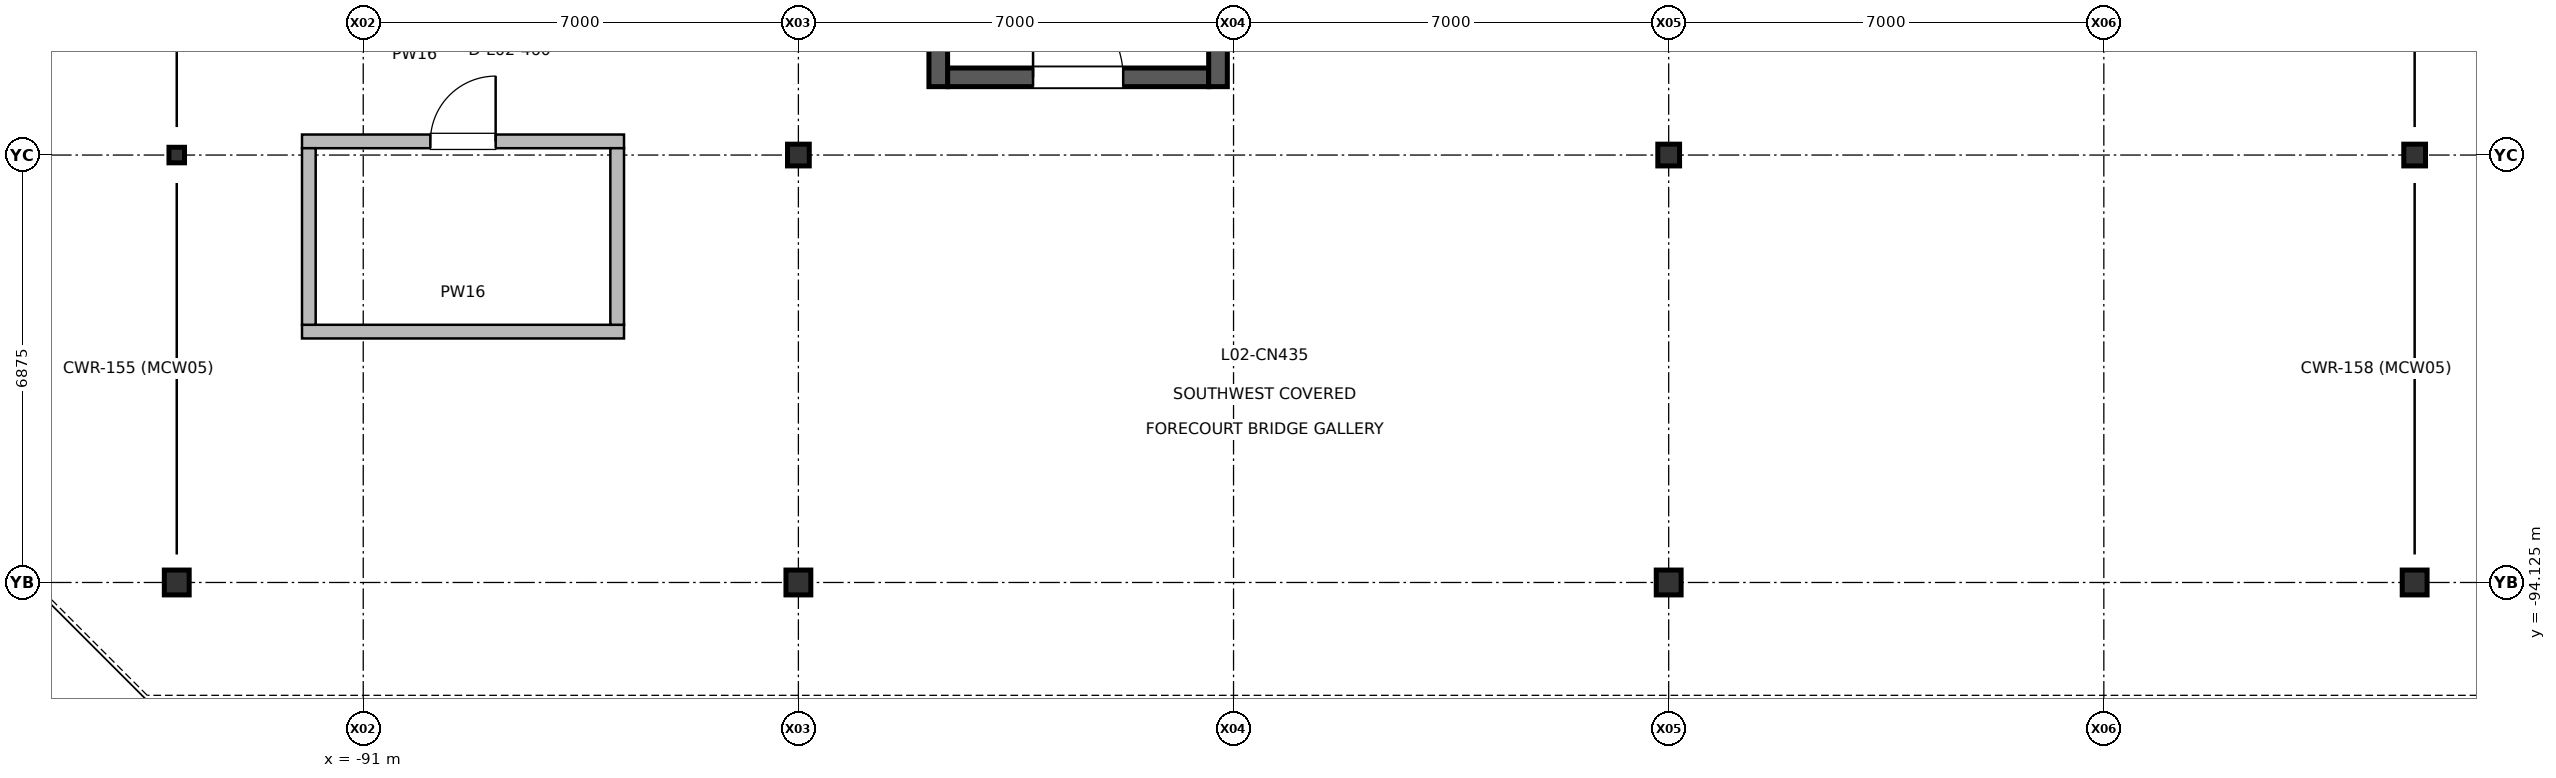
"""IFC4 building model, lengths in metres.
Left out: names, types, materials, properties, quantities, classifications, styles, units other than length and angle.
Written with IfcOpenShell. Run it as: python <this file> out.ifc"""

import sys

from ifc_helpers import new_model, si_unit, direction, frame, frame_2d, origin, origin_2d, place, context, subcontext, project, spatial, rectangle, i_section, extrude, element, fill, save


model = new_model("IFC4")
c1 = context("Model", 3, precision=1e-05, world=origin(), true_north=direction((0.0, 1.0)))
c2 = subcontext(c1, "Body", "Model", "MODEL_VIEW")
j1 = project(units=[si_unit("LENGTHUNIT", "METRE"), si_unit("PLANEANGLEUNIT", "RADIAN")], contexts=[c1])
p1 = place(None, origin())
s1 = spatial("IfcSite", under=j1, at=p1, CompositionType="ELEMENT")
p2 = place(p1, origin())
s2 = spatial("IfcBuilding", under=s1, at=p2, CompositionType="ELEMENT")
p3 = place(p2, frame((0.0, 0.0, 6.0)))
s3 = spatial("IfcBuildingStorey", under=s2, at=p3, CompositionType="ELEMENT", Elevation=6.0)
p4 = place(p3, frame((-94.0, -94.125, 0.0), z_axis=(0.0, 0.0, 1.0), x_axis=(1.0, 0.0, 0.0)))
e1 = element("IfcColumn", 1, at=p4, inside=s3, PredefinedType="COLUMN", context=c2, shape_type="SweptSolid", body=[
    extrude(i_section(OverallWidth=0.4, OverallDepth=0.4, WebThickness=0.013, FlangeThickness=0.021, at=origin_2d()), origin(), (0.0, 0.0, 1.0), 5.4),
])
p5 = place(p3, frame((-94.0, -87.25, 0.0), z_axis=(0.0, 0.0, 1.0), x_axis=(1.0, 0.0, 0.0)))
e2 = element("IfcColumn", 2, at=p5, inside=s3, PredefinedType="COLUMN", context=c2, shape_type="SweptSolid", body=[
    extrude(i_section(OverallWidth=0.25, OverallDepth=0.25, WebThickness=0.009, FlangeThickness=0.014, at=origin_2d()), origin(), (0.0, 0.0, 1.0), 5.4),
])
p6 = place(p3, frame((-84.0, -94.125, 0.0), z_axis=(0.0, 0.0, 1.0), x_axis=(1.0, 0.0, 0.0)))
e3 = element("IfcColumn", 3, at=p6, inside=s3, PredefinedType="COLUMN", context=c2, shape_type="SweptSolid", body=[
    extrude(i_section(OverallWidth=0.4, OverallDepth=0.4, WebThickness=0.013, FlangeThickness=0.021, at=origin_2d()), origin(), (0.0, 0.0, 1.0), 5.4),
])
p7 = place(p3, frame((-84.0, -87.25, 0.0), z_axis=(0.0, 0.0, 1.0), x_axis=(1.0, 0.0, 0.0)))
e4 = element("IfcColumn", 4, at=p7, inside=s3, PredefinedType="COLUMN", context=c2, shape_type="SweptSolid", body=[
    extrude(i_section(OverallWidth=0.35, OverallDepth=0.35, WebThickness=0.012, FlangeThickness=0.019, at=origin_2d()), origin(), (0.0, 0.0, 1.0), 5.4),
])
p8 = place(p3, frame((-70.0, -94.125, 0.0), z_axis=(0.0, 0.0, 1.0), x_axis=(1.0, 0.0, 0.0)))
e5 = element("IfcColumn", 5, at=p8, inside=s3, PredefinedType="COLUMN", context=c2, shape_type="SweptSolid", body=[
    extrude(i_section(OverallWidth=0.4, OverallDepth=0.4, WebThickness=0.013, FlangeThickness=0.021, at=origin_2d()), origin(), (0.0, 0.0, 1.0), 5.4),
])
p9 = place(p3, frame((-70.0, -87.25, 0.0), z_axis=(0.0, 0.0, 1.0), x_axis=(1.0, 0.0, 0.0)))
e6 = element("IfcColumn", 6, at=p9, inside=s3, PredefinedType="COLUMN", context=c2, shape_type="SweptSolid", body=[
    extrude(i_section(OverallWidth=0.35, OverallDepth=0.35, WebThickness=0.012, FlangeThickness=0.019, at=origin_2d()), origin(), (0.0, 0.0, 1.0), 5.4),
])
p10 = place(p3, frame((-58.0, -94.125, 0.0), z_axis=(0.0, 0.0, 1.0), x_axis=(1.0, 0.0, 0.0)))
e7 = element("IfcColumn", 7, at=p10, inside=s3, PredefinedType="COLUMN", context=c2, shape_type="SweptSolid", body=[
    extrude(i_section(OverallWidth=0.4, OverallDepth=0.4, WebThickness=0.013, FlangeThickness=0.021, at=origin_2d()), origin(), (0.0, 0.0, 1.0), 5.4),
])
p11 = place(p3, frame((-58.0, -87.25, 0.0), z_axis=(0.0, 0.0, 1.0), x_axis=(1.0, 0.0, 0.0)))
e8 = element("IfcColumn", 8, at=p11, inside=s3, PredefinedType="COLUMN", context=c2, shape_type="SweptSolid", body=[
    extrude(i_section(OverallWidth=0.35, OverallDepth=0.35, WebThickness=0.012, FlangeThickness=0.019, at=origin_2d()), origin(), (0.0, 0.0, 1.0), 5.4),
])
p12 = place(p3, frame((-91.985, -87.03, 0.0), z_axis=(0.0, 0.0, 1.0), x_axis=(1.0, 0.0, 0.0)))
e9 = element("IfcWall", 9, at=p12, inside=s3, PredefinedType="PARTITIONING", context=c2, shape_type="SweptSolid", body=[
    extrude(rectangle(XDim=5.18, YDim=0.22, at=frame_2d((2.59, 0.0))), origin(), (0.0, 0.0, 1.0), 4.42),
])
p13 = place(p12, frame((2.065, 0.0, 0.0)))
e10 = element("IfcOpeningElement", 10, at=p13, cuts=e9, PredefinedType="OPENING", context=c2, shape_type="SweptSolid", body=[
    extrude(rectangle(XDim=1.05, YDim=2.25, at=frame_2d((0.525, 1.125))), frame((0.0, 0.12, 0.0), z_axis=(0.0, -1.0, 0.0), x_axis=(1.0, 0.0, 0.0)), (0.0, 0.0, 1.0), 0.24),
])
p14 = place(p3, frame((-91.985, -90.09, 0.0), z_axis=(0.0, 0.0, 1.0), x_axis=(1.0, 0.0, 0.0)))
e11 = element("IfcWall", 11, at=p14, inside=s3, PredefinedType="PARTITIONING", context=c2, shape_type="SweptSolid", body=[
    extrude(rectangle(XDim=5.18, YDim=0.22, at=frame_2d((2.59, 0.0))), origin(), (0.0, 0.0, 1.0), 4.42),
])
for number, where, z_axis, x_axis in (
    (12, (-91.875, -89.98, 0.0), (0.0, 0.0, 1.0), (0.0, 1.0, 0.0)),
    (13, (-86.915, -89.98, 0.0), (0.0, 0.0, 1.0), (0.0, 1.0, 0.0)),
):
    element("IfcWall", number, at=place(p3, frame(where, z_axis=z_axis, x_axis=x_axis)), inside=s3, PredefinedType="PARTITIONING", context=c2, shape_type="SweptSolid", body=[
        extrude(rectangle(XDim=2.84, YDim=0.22, at=frame_2d((1.42, 0.0))), origin(), (0.0, 0.0, 1.0), 4.42),
    ])
p15 = place(p3, frame((-81.6, -86.0, 0.0), z_axis=(0.0, 0.0, 1.0), x_axis=(1.0, 0.0, 0.0)))
e14 = element("IfcWall", 14, at=p15, inside=s3, PredefinedType="SHEAR", context=c2, shape_type="SweptSolid", body=[
    extrude(rectangle(XDim=4.2, YDim=0.3, at=frame_2d((2.1, 0.0))), origin(), (0.0, 0.0, 1.0), 5.15),
])
p16 = place(p15, frame((1.375, 0.0, 0.0)))
e15 = element("IfcOpeningElement", 15, at=p16, cuts=e14, PredefinedType="OPENING", context=c2, shape_type="SweptSolid", body=[
    extrude(rectangle(XDim=1.45, YDim=2.2, at=frame_2d((0.725, 1.1))), frame((0.0, 0.16, 0.0), z_axis=(0.0, -1.0, 0.0), x_axis=(1.0, 0.0, 0.0)), (0.0, 0.0, 1.0), 0.32),
])
for number, where, z_axis, x_axis in (
    (16, (-81.75, -86.15, 0.0), (0.0, 0.0, 1.0), (0.0, 1.0, 0.0)),
    (17, (-77.25, -86.15, 0.0), (0.0, 0.0, 1.0), (0.0, 1.0, 0.0)),
):
    element("IfcWall", number, at=place(p3, frame(where, z_axis=z_axis, x_axis=x_axis)), inside=s3, PredefinedType="SHEAR", context=c2, shape_type="SweptSolid", body=[
        extrude(rectangle(XDim=8.45, YDim=0.3, at=frame_2d((4.225, 0.0))), origin(), (0.0, 0.0, 1.0), 5.15),
    ])
p17 = place(p13, origin())
e18 = element("IfcDoor", 18, at=p17, inside=s3, OperationType="SINGLE_SWING_RIGHT", PredefinedType="DOOR", context=c2, shape_type="SweptSolid", body=[
    extrude(rectangle(XDim=1.05, YDim=2.25, at=frame_2d((0.525, 1.125))), frame((0.0, 0.025, 0.0), z_axis=(0.0, -1.0, 0.0), x_axis=(1.0, 0.0, 0.0)), (0.0, 0.0, 1.0), 0.05),
])
fill(e10, e18)
p18 = place(p16, origin())
e19 = element("IfcDoor", 19, at=p18, inside=s3, OperationType="SINGLE_SWING_LEFT", PredefinedType="DOOR", context=c2, shape_type="SweptSolid", body=[
    extrude(rectangle(XDim=1.45, YDim=2.2, at=frame_2d((0.725, 1.1))), frame((0.0, 0.025, 0.0), z_axis=(0.0, -1.0, 0.0), x_axis=(1.0, 0.0, 0.0)), (0.0, 0.0, 1.0), 0.05),
])
fill(e15, e19)
save(model, sys.argv[1])
